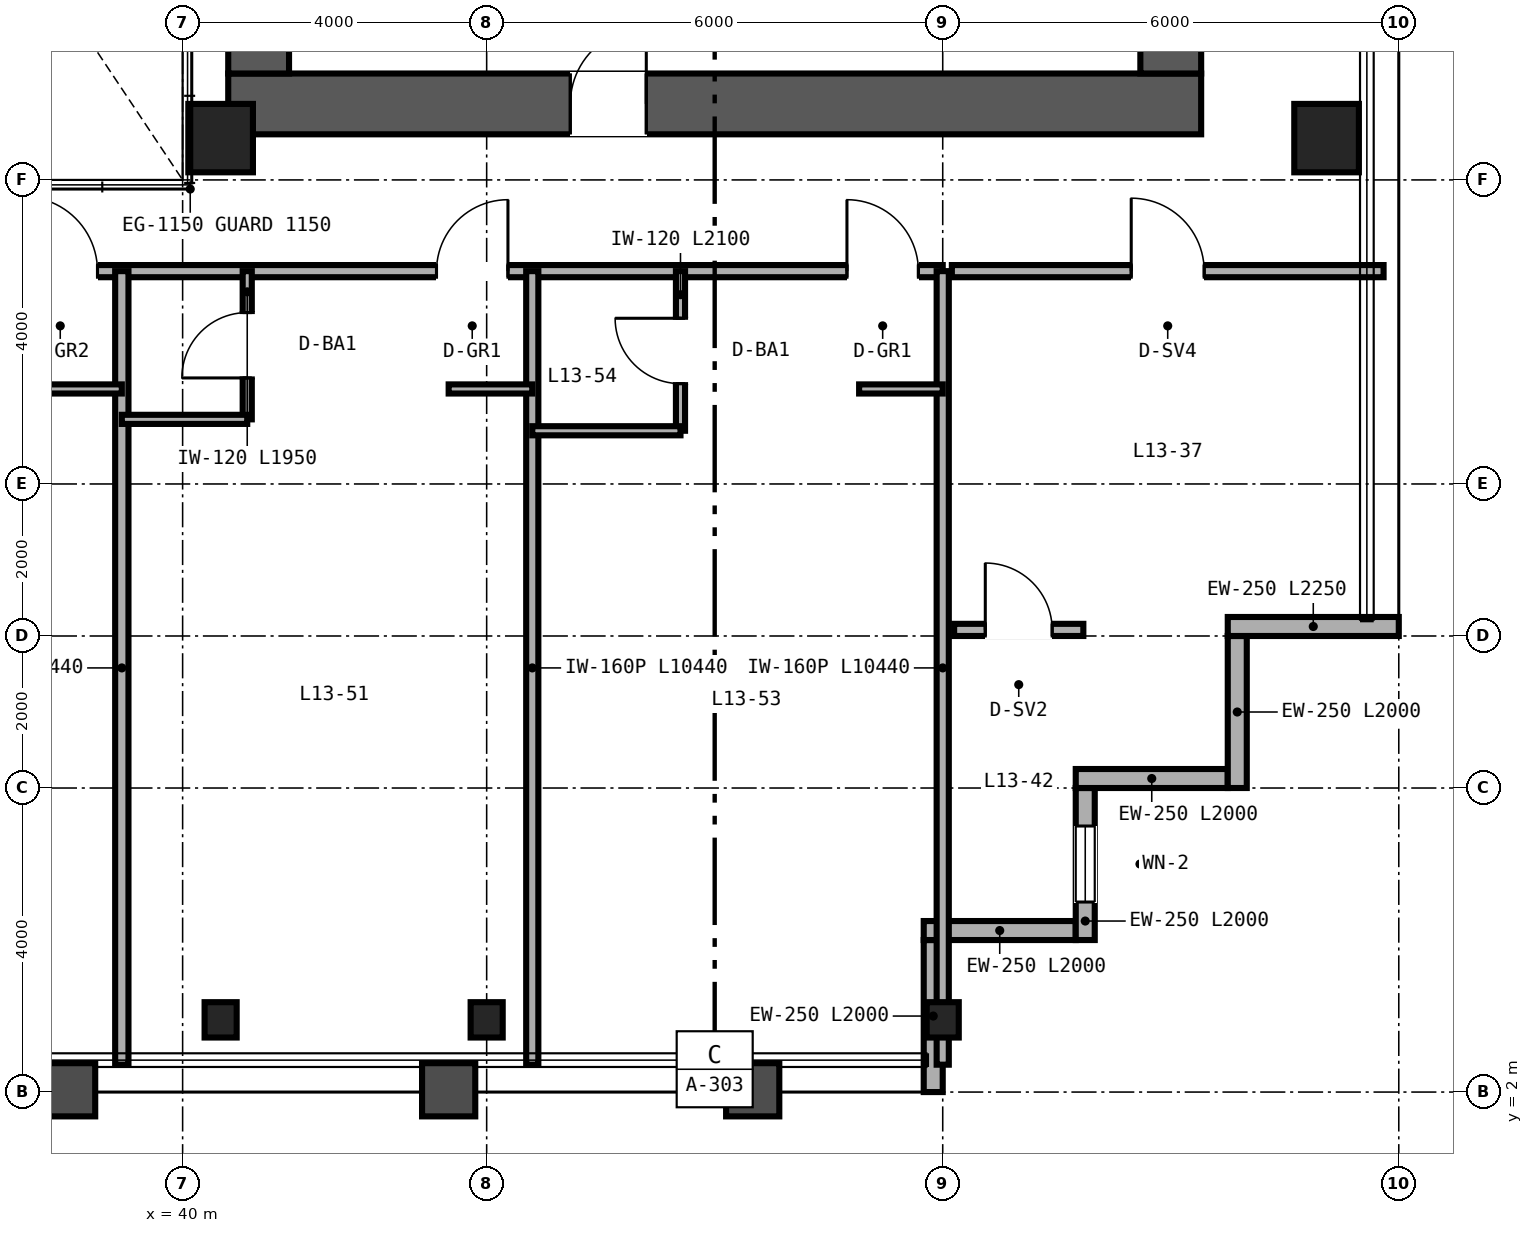
"""IFC4 building model, lengths in metres.
Left out: names, types, materials, properties, quantities, classifications, styles, units other than length and angle.
Written with IfcOpenShell. Run it as: python <this file> out.ifc"""

import sys

from ifc_helpers import new_model, si_unit, direction, frame, frame_2d, origin, origin_2d, place, context, subcontext, project, spatial, rectangle, hollow_rectangle, i_section, extrude, source, transform, mapped, element, fill, save


model = new_model("IFC4")
c1 = context("Model", 3, precision=1e-05, world=origin(), true_north=direction((0.0, 1.0)))
c2 = subcontext(c1, "Body", "Model", "MODEL_VIEW")
j1 = project(units=[si_unit("LENGTHUNIT", "METRE"), si_unit("PLANEANGLEUNIT", "RADIAN")], contexts=[c1])
p1 = place(None, origin())
s1 = spatial("IfcSite", under=j1, at=p1, CompositionType="ELEMENT")
p2 = place(p1, origin())
s2 = spatial("IfcBuilding", under=s1, at=p2, CompositionType="ELEMENT")
p3 = place(p2, frame((0.0, 0.0, 56.4)))
s3 = spatial("IfcBuildingStorey", under=s2, at=p3, CompositionType="ELEMENT", Elevation=56.4)
p4 = place(p3, frame((40.6, 15.0, 0.0), z_axis=(0.0, 0.0, 1.0), x_axis=(1.0, 0.0, 0.0)))
e1 = element("IfcWall", 1, at=p4, inside=s3, PredefinedType="SHEAR", context=c2, shape_type="SweptSolid", body=[
    extrude(rectangle(XDim=12.8, YDim=0.8, at=frame_2d((6.4, 0.0))), origin(), (0.0, 0.0, 1.0), 3.35),
])
p5 = place(p4, frame((4.5, 0.0, 0.0)))
e2 = element("IfcOpeningElement", 2, at=p5, cuts=e1, PredefinedType="OPENING", context=c2, shape_type="SweptSolid", body=[
    extrude(rectangle(XDim=1.0, YDim=2.15, at=frame_2d((0.5, 1.075))), frame((0.0, 0.41, 0.0), z_axis=(0.0, -1.0, 0.0), x_axis=(1.0, 0.0, 0.0)), (0.0, 0.0, 1.0), 0.82),
])
for number, where, z_axis, x_axis in (
    (3, (41.0, 15.4, 0.0), (0.0, 0.0, 1.0), (0.0, 1.0, 0.0)),
    (4, (53.0, 15.4, 0.0), (0.0, 0.0, 1.0), (0.0, 1.0, 0.0)),
):
    element("IfcWall", number, at=place(p3, frame(where, z_axis=z_axis, x_axis=x_axis)), inside=s3, PredefinedType="SHEAR", context=c2, shape_type="SweptSolid", body=[
        extrude(rectangle(XDim=21.2, YDim=0.8, at=frame_2d((10.6, 0.0))), origin(), (0.0, 0.0, 1.0), 3.35),
    ])
m1 = source(origin(), c2, "Body", "SweptSolid", [
    extrude(hollow_rectangle(XDim=0.85, YDim=0.9, WallThickness=0.04, at=origin_2d()), origin(), (0.0, 0.0, 1.0), 3.35),
])
for number, where, z_axis, x_axis in (
    (5, (40.5, 14.55, 0.0), (0.0, 0.0, 1.0), (1.0, 0.0, 0.0)),
    (6, (55.05, 14.55, 0.0), (0.0, 0.0, 1.0), (1.0, 0.0, 0.0)),
):
    element("IfcColumn", number, at=place(p3, frame(where, z_axis=z_axis, x_axis=x_axis)), inside=s3, PredefinedType="COLUMN", context=c2, shape_type="MappedRepresentation", body=[
        mapped(m1, transform((0.0, 0.0, 0.0), scale=1.0)),
    ])
m2 = source(origin(), c2, "Body", "SweptSolid", [
    extrude(i_section(OverallWidth=0.422, OverallDepth=0.465, WebThickness=0.045, FlangeThickness=0.073, FilletRadius=0.025, at=origin_2d()), origin(), (0.0, 0.0, 1.0), 3.35),
])
for number, where, z_axis, x_axis in (
    (7, (40.5, 2.95, 0.0), (0.0, 0.0, 1.0), (1.0, 0.0, 0.0)),
    (8, (44.0, 2.95, 0.0), (0.0, 0.0, 1.0), (1.0, 0.0, 0.0)),
    (9, (50.0, 2.95, 0.0), (0.0, 0.0, 1.0), (1.0, 0.0, 0.0)),
):
    element("IfcColumn", number, at=place(p3, frame(where, z_axis=z_axis, x_axis=x_axis)), inside=s3, PredefinedType="COLUMN", context=c2, shape_type="MappedRepresentation", body=[
        mapped(m2, transform((0.0, 0.0, 0.0), scale=1.0)),
    ])
p6 = place(p3, frame((49.875, 2.0, 0.0), z_axis=(0.0, 0.0, 1.0), x_axis=(0.0, 1.0, 0.0)))
e10 = element("IfcWall", 10, at=p6, inside=s3, PredefinedType="SOLIDWALL", context=c2, shape_type="SweptSolid", body=[
    extrude(rectangle(XDim=2.0, YDim=0.25, at=frame_2d((1.0, 0.0))), origin(), (0.0, 0.0, 1.0), 2.657),
])
p7 = place(p3, frame((49.75, 4.125, 0.0), z_axis=(0.0, 0.0, 1.0), x_axis=(1.0, 0.0, 0.0)))
e11 = element("IfcWall", 11, at=p7, inside=s3, PredefinedType="SOLIDWALL", context=c2, shape_type="SweptSolid", body=[
    extrude(rectangle(XDim=2.0, YDim=0.25, at=frame_2d((1.0, 0.0))), origin(), (0.0, 0.0, 1.0), 3.35),
])
p8 = place(p3, frame((51.875, 4.0, 0.0), z_axis=(0.0, 0.0, 1.0), x_axis=(0.0, 1.0, 0.0)))
e12 = element("IfcWall", 12, at=p8, inside=s3, PredefinedType="SOLIDWALL", context=c2, shape_type="SweptSolid", body=[
    extrude(rectangle(XDim=2.0, YDim=0.25, at=frame_2d((1.0, 0.0))), origin(), (0.0, 0.0, 1.0), 3.35),
])
p9 = place(p8, frame((0.5, 0.0, 0.85)))
e13 = element("IfcOpeningElement", 13, at=p9, cuts=e12, PredefinedType="OPENING", context=c2, shape_type="SweptSolid", body=[
    extrude(rectangle(XDim=1.0, YDim=1.9, at=frame_2d((0.5, 0.95))), frame((0.0, 0.135, 0.0), z_axis=(0.0, -1.0, 0.0), x_axis=(1.0, 0.0, 0.0)), (0.0, 0.0, 1.0), 0.27),
])
for number, where, z_axis, x_axis in (
    (14, (51.75, 6.125, 0.0), (0.0, 0.0, 1.0), (1.0, 0.0, 0.0)),
    (15, (53.875, 6.0, 0.0), (0.0, 0.0, 1.0), (0.0, 1.0, 0.0)),
):
    element("IfcWall", number, at=place(p3, frame(where, z_axis=z_axis, x_axis=x_axis)), inside=s3, PredefinedType="SOLIDWALL", context=c2, shape_type="SweptSolid", body=[
        extrude(rectangle(XDim=2.0, YDim=0.25, at=frame_2d((1.0, 0.0))), origin(), (0.0, 0.0, 1.0), 3.35),
    ])
p10 = place(p3, frame((53.75, 8.125, 0.0), z_axis=(0.0, 0.0, 1.0), x_axis=(1.0, 0.0, 0.0)))
e16 = element("IfcWall", 16, at=p10, inside=s3, PredefinedType="SOLIDWALL", context=c2, shape_type="SweptSolid", body=[
    extrude(rectangle(XDim=2.25, YDim=0.25, at=frame_2d((1.125, 0.0))), origin(), (0.0, 0.0, 1.0), 3.35),
])
p11 = place(p3, frame((50.12, 12.8, 0.0), z_axis=(0.0, 0.0, 1.0), x_axis=(1.0, 0.0, 0.0)))
e17 = element("IfcWall", 17, at=p11, inside=s3, PredefinedType="PARTITIONING", context=c2, shape_type="SweptSolid", body=[
    extrude(rectangle(XDim=5.68, YDim=0.16, at=frame_2d((2.84, 0.0))), origin(), (0.0, 0.0, 1.0), 3.35),
])
p12 = place(p11, frame((2.36, 0.0, 0.0)))
e18 = element("IfcOpeningElement", 18, at=p12, cuts=e17, PredefinedType="OPENING", context=c2, shape_type="SweptSolid", body=[
    extrude(rectangle(XDim=0.96, YDim=2.15, at=frame_2d((0.48, 1.075))), frame((0.0, 0.09, 0.0), z_axis=(0.0, -1.0, 0.0), x_axis=(1.0, 0.0, 0.0)), (0.0, 0.0, 1.0), 0.18),
])
p13 = place(p3, frame((50.15, 8.08, 0.0), z_axis=(0.0, 0.0, 1.0), x_axis=(1.0, 0.0, 0.0)))
e19 = element("IfcWall", 19, at=p13, inside=s3, PredefinedType="PARTITIONING", context=c2, shape_type="SweptSolid", body=[
    extrude(rectangle(XDim=1.7, YDim=0.16, at=frame_2d((0.85, 0.0))), origin(), (0.0, 0.0, 1.0), 3.35),
])
p14 = place(p13, frame((0.41, 0.0, 0.0)))
e20 = element("IfcOpeningElement", 20, at=p14, cuts=e19, PredefinedType="OPENING", context=c2, shape_type="SweptSolid", body=[
    extrude(rectangle(XDim=0.88, YDim=2.15, at=frame_2d((0.44, 1.075))), frame((0.0, 0.09, 0.0), z_axis=(0.0, -1.0, 0.0), x_axis=(1.0, 0.0, 0.0)), (0.0, 0.0, 1.0), 0.18),
])
p15 = place(p3, frame((14.0, 12.8, 0.0), z_axis=(0.0, 0.0, 1.0), x_axis=(1.0, 0.0, 0.0)))
e21 = element("IfcWall", 21, at=p15, inside=s3, PredefinedType="PARTITIONING", context=c2, shape_type="SweptSolid", body=[
    extrude(rectangle(XDim=36.0, YDim=0.16, at=frame_2d((18.0, 0.0))), origin(), (0.0, 0.0, 1.0), 2.571),
])
p16 = place(p15, frame((7.1, 0.0, 0.0)))
e22 = element("IfcOpeningElement", 22, at=p16, cuts=e21, PredefinedType="OPENING", context=c2, shape_type="SweptSolid", body=[
    extrude(rectangle(XDim=0.98, YDim=2.2, at=frame_2d((0.49, 1.1))), frame((0.0, 0.09, 0.0), z_axis=(0.0, -1.0, 0.0), x_axis=(1.0, 0.0, 0.0)), (0.0, 0.0, 1.0), 0.18),
])
p17 = place(p15, frame((15.5, 0.0, 0.0)))
e23 = element("IfcOpeningElement", 23, at=p17, cuts=e21, PredefinedType="OPENING", context=c2, shape_type="SweptSolid", body=[
    extrude(rectangle(XDim=0.98, YDim=2.2, at=frame_2d((0.49, 1.1))), frame((0.0, 0.09, 0.0), z_axis=(0.0, -1.0, 0.0), x_axis=(1.0, 0.0, 0.0)), (0.0, 0.0, 1.0), 0.18),
])
p18 = place(p15, frame((23.9, 0.0, 0.0)))
e24 = element("IfcOpeningElement", 24, at=p18, cuts=e21, PredefinedType="OPENING", context=c2, shape_type="SweptSolid", body=[
    extrude(rectangle(XDim=0.98, YDim=2.2, at=frame_2d((0.49, 1.1))), frame((0.0, 0.09, 0.0), z_axis=(0.0, -1.0, 0.0), x_axis=(1.0, 0.0, 0.0)), (0.0, 0.0, 1.0), 0.18),
])
p19 = place(p15, frame((29.34, 0.0, 0.0)))
e25 = element("IfcOpeningElement", 25, at=p19, cuts=e21, PredefinedType="OPENING", context=c2, shape_type="SweptSolid", body=[
    extrude(rectangle(XDim=0.94, YDim=2.15, at=frame_2d((0.47, 1.075))), frame((0.0, 0.09, 0.0), z_axis=(0.0, -1.0, 0.0), x_axis=(1.0, 0.0, 0.0)), (0.0, 0.0, 1.0), 0.18),
])
p20 = place(p15, frame((34.74, 0.0, 0.0)))
e26 = element("IfcOpeningElement", 26, at=p20, cuts=e21, PredefinedType="OPENING", context=c2, shape_type="SweptSolid", body=[
    extrude(rectangle(XDim=0.94, YDim=2.15, at=frame_2d((0.47, 1.075))), frame((0.0, 0.09, 0.0), z_axis=(0.0, -1.0, 0.0), x_axis=(1.0, 0.0, 0.0)), (0.0, 0.0, 1.0), 0.18),
])
p21 = place(p3, frame((50.0, 2.36, 0.0), z_axis=(0.0, 0.0, 1.0), x_axis=(0.0, 1.0, 0.0)))
e27 = element("IfcWall", 27, at=p21, inside=s3, PredefinedType="PARTITIONING", context=c2, shape_type="SweptSolid", body=[
    extrude(rectangle(XDim=10.44, YDim=0.16, at=frame_2d((5.22, 0.0))), origin(), (0.0, 0.0, 1.0), 2.657),
])
p22 = place(p3, frame((39.2, 2.36, 0.0), z_axis=(0.0, 0.0, 1.0), x_axis=(0.0, 1.0, 0.0)))
e28 = element("IfcWall", 28, at=p22, inside=s3, PredefinedType="PARTITIONING", context=c2, shape_type="SweptSolid", body=[
    extrude(rectangle(XDim=10.44, YDim=0.175, at=frame_2d((5.22, 0.0))), origin(), (0.0, 0.0, 1.0), 2.423),
])
p23 = place(p3, frame((38.1, 11.25, 0.0), z_axis=(0.0, 0.0, 1.0), x_axis=(1.0, 0.0, 0.0)))
e29 = element("IfcWall", 29, at=p23, inside=s3, PredefinedType="PARTITIONING", context=c2, shape_type="SweptSolid", body=[
    extrude(rectangle(XDim=1.1, YDim=0.12, at=frame_2d((0.55, 0.0))), origin(), (0.0, 0.0, 1.0), 3.35),
])
p24 = place(p3, frame((44.6, 2.36, 0.0), z_axis=(0.0, 0.0, 1.0), x_axis=(0.0, 1.0, 0.0)))
e30 = element("IfcWall", 30, at=p24, inside=s3, PredefinedType="PARTITIONING", context=c2, shape_type="SweptSolid", body=[
    extrude(rectangle(XDim=10.44, YDim=0.16, at=frame_2d((5.22, 0.0))), origin(), (0.0, 0.0, 1.0), 2.657),
])
p25 = place(p3, frame((40.85, 10.85, 0.0), z_axis=(0.0, 0.0, 1.0), x_axis=(0.0, 1.0, 0.0)))
e31 = element("IfcWall", 31, at=p25, inside=s3, PredefinedType="PARTITIONING", context=c2, shape_type="SweptSolid", body=[
    extrude(rectangle(XDim=1.95, YDim=0.12, at=frame_2d((0.975, 0.0))), origin(), (0.0, 0.0, 1.0), 3.35),
])
p26 = place(p25, frame((0.545, 0.0, 0.0)))
e32 = element("IfcOpeningElement", 32, at=p26, cuts=e31, PredefinedType="OPENING", context=c2, shape_type="SweptSolid", body=[
    extrude(rectangle(XDim=0.86, YDim=2.1, at=frame_2d((0.43, 1.05))), frame((0.0, 0.07, 0.0), z_axis=(0.0, -1.0, 0.0), x_axis=(1.0, 0.0, 0.0)), (0.0, 0.0, 1.0), 0.14),
])
p27 = place(p3, frame((39.2, 10.85, 0.0), z_axis=(0.0, 0.0, 1.0), x_axis=(1.0, 0.0, 0.0)))
e33 = element("IfcWall", 33, at=p27, inside=s3, PredefinedType="PARTITIONING", context=c2, shape_type="SweptSolid", body=[
    extrude(rectangle(XDim=1.65, YDim=0.12, at=frame_2d((0.825, 0.0))), origin(), (0.0, 0.0, 1.0), 2.571),
])
p28 = place(p3, frame((43.5, 11.25, 0.0), z_axis=(0.0, 0.0, 1.0), x_axis=(1.0, 0.0, 0.0)))
e34 = element("IfcWall", 34, at=p28, inside=s3, PredefinedType="PARTITIONING", context=c2, shape_type="SweptSolid", body=[
    extrude(rectangle(XDim=1.1, YDim=0.12, at=frame_2d((0.55, 0.0))), origin(), (0.0, 0.0, 1.0), 3.35),
])
p29 = place(p3, frame((46.55, 10.7, 0.0), z_axis=(0.0, 0.0, 1.0), x_axis=(0.0, 1.0, 0.0)))
e35 = element("IfcWall", 35, at=p29, inside=s3, PredefinedType="PARTITIONING", context=c2, shape_type="SweptSolid", body=[
    extrude(rectangle(XDim=2.1, YDim=0.12, at=frame_2d((1.05, 0.0))), origin(), (0.0, 0.0, 1.0), 3.35),
])
p30 = place(p29, frame((0.62, 0.0, 0.0)))
e36 = element("IfcOpeningElement", 36, at=p30, cuts=e35, PredefinedType="OPENING", context=c2, shape_type="SweptSolid", body=[
    extrude(rectangle(XDim=0.86, YDim=2.1, at=frame_2d((0.43, 1.05))), frame((0.0, 0.07, 0.0), z_axis=(0.0, -1.0, 0.0), x_axis=(1.0, 0.0, 0.0)), (0.0, 0.0, 1.0), 0.14),
])
p31 = place(p3, frame((44.6, 10.7, 0.0), z_axis=(0.0, 0.0, 1.0), x_axis=(1.0, 0.0, 0.0)))
e37 = element("IfcWall", 37, at=p31, inside=s3, PredefinedType="PARTITIONING", context=c2, shape_type="SweptSolid", body=[
    extrude(rectangle(XDim=1.95, YDim=0.12, at=frame_2d((0.975, 0.0))), origin(), (0.0, 0.0, 1.0), 3.35),
])
p32 = place(p3, frame((48.9, 11.25, 0.0), z_axis=(0.0, 0.0, 1.0), x_axis=(1.0, 0.0, 0.0)))
e38 = element("IfcWall", 38, at=p32, inside=s3, PredefinedType="PARTITIONING", context=c2, shape_type="SweptSolid", body=[
    extrude(rectangle(XDim=1.1, YDim=0.12, at=frame_2d((0.55, 0.0))), origin(), (0.0, 0.0, 1.0), 3.35),
])
m3 = source(origin(), c2, "Body", "SweptSolid", [
    extrude(rectangle(XDim=1.0, YDim=1.9, at=frame_2d((0.5, 0.95))), frame((0.0, 0.03, 0.0), z_axis=(0.0, -1.0, 0.0), x_axis=(1.0, 0.0, 0.0)), (0.0, 0.0, 1.0), 0.06),
])
p33 = place(p9, origin())
e39 = element("IfcWindow", 39, at=p33, inside=s3, PartitioningType="SINGLE_PANEL", PredefinedType="WINDOW", context=c2, shape_type="MappedRepresentation", body=[
    mapped(m3, transform((0.0, 0.0, 0.0), scale=1.0)),
])
fill(e13, e39)
m4 = source(origin(), c2, "Body", "SweptSolid", [
    extrude(rectangle(XDim=1.0, YDim=2.15, at=frame_2d((0.5, 1.075))), frame((0.0, 0.025, 0.0), z_axis=(0.0, -1.0, 0.0), x_axis=(1.0, 0.0, 0.0)), (0.0, 0.0, 1.0), 0.05),
])
p34 = place(p5, origin())
e40 = element("IfcDoor", 40, at=p34, inside=s3, OperationType="SINGLE_SWING_RIGHT", PredefinedType="DOOR", context=c2, shape_type="MappedRepresentation", body=[
    mapped(m4, transform((0.0, 0.0, 0.0), scale=1.0)),
])
fill(e2, e40)
m5 = source(origin(), c2, "Body", "SweptSolid", [
    extrude(rectangle(XDim=0.96, YDim=2.15, at=frame_2d((0.48, 1.075))), frame((0.0, 0.025, 0.0), z_axis=(0.0, -1.0, 0.0), x_axis=(1.0, 0.0, 0.0)), (0.0, 0.0, 1.0), 0.05),
])
p35 = place(p12, origin())
e41 = element("IfcDoor", 41, at=p35, inside=s3, OperationType="SINGLE_SWING_LEFT", PredefinedType="DOOR", context=c2, shape_type="MappedRepresentation", body=[
    mapped(m5, transform((0.0, 0.0, 0.0), scale=1.0)),
])
fill(e18, e41)
m6 = source(origin(), c2, "Body", "SweptSolid", [
    extrude(rectangle(XDim=0.88, YDim=2.15, at=frame_2d((0.44, 1.075))), frame((0.0, 0.025, 0.0), z_axis=(0.0, -1.0, 0.0), x_axis=(1.0, 0.0, 0.0)), (0.0, 0.0, 1.0), 0.05),
])
p36 = place(p14, origin())
e42 = element("IfcDoor", 42, at=p36, inside=s3, OperationType="SINGLE_SWING_LEFT", PredefinedType="DOOR", context=c2, shape_type="MappedRepresentation", body=[
    mapped(m6, transform((0.0, 0.0, 0.0), scale=1.0)),
])
fill(e20, e42)
m7 = source(origin(), c2, "Body", "SweptSolid", [
    extrude(rectangle(XDim=0.86, YDim=2.1, at=frame_2d((0.43, 1.05))), frame((0.0, 0.025, 0.0), z_axis=(0.0, -1.0, 0.0), x_axis=(1.0, 0.0, 0.0)), (0.0, 0.0, 1.0), 0.05),
])
p37 = place(p26, origin())
e43 = element("IfcDoor", 43, at=p37, inside=s3, OperationType="SINGLE_SWING_LEFT", PredefinedType="DOOR", context=c2, shape_type="MappedRepresentation", body=[
    mapped(m7, transform((0.0, 0.0, 0.0), scale=1.0)),
])
fill(e32, e43)
p38 = place(p30, origin())
e44 = element("IfcDoor", 44, at=p38, inside=s3, OperationType="SINGLE_SWING_RIGHT", PredefinedType="DOOR", context=c2, shape_type="MappedRepresentation", body=[
    mapped(m7, transform((0.0, 0.0, 0.0), scale=1.0)),
])
fill(e36, e44)
m8 = source(origin(), c2, "Body", "SweptSolid", [
    extrude(rectangle(XDim=0.98, YDim=2.2, at=frame_2d((0.49, 1.1))), frame((0.0, 0.025, 0.0), z_axis=(0.0, -1.0, 0.0), x_axis=(1.0, 0.0, 0.0)), (0.0, 0.0, 1.0), 0.05),
])
p39 = place(p18, origin())
e45 = element("IfcDoor", 45, at=p39, inside=s3, OperationType="SINGLE_SWING_LEFT", PredefinedType="DOOR", context=c2, shape_type="MappedRepresentation", body=[
    mapped(m8, transform((0.0, 0.0, 0.0), scale=1.0)),
])
fill(e24, e45)
m9 = source(origin(), c2, "Body", "SweptSolid", [
    extrude(rectangle(XDim=0.94, YDim=2.15, at=frame_2d((0.47, 1.075))), frame((0.0, 0.025, 0.0), z_axis=(0.0, -1.0, 0.0), x_axis=(1.0, 0.0, 0.0)), (0.0, 0.0, 1.0), 0.05),
])
p40 = place(p19, origin())
e46 = element("IfcDoor", 46, at=p40, inside=s3, OperationType="SINGLE_SWING_RIGHT", PredefinedType="DOOR", context=c2, shape_type="MappedRepresentation", body=[
    mapped(m9, transform((0.0, 0.0, 0.0), scale=1.0)),
])
fill(e25, e46)
p41 = place(p20, origin())
e47 = element("IfcDoor", 47, at=p41, inside=s3, OperationType="SINGLE_SWING_LEFT", PredefinedType="DOOR", context=c2, shape_type="MappedRepresentation", body=[
    mapped(m9, transform((0.0, 0.0, 0.0), scale=1.0)),
])
fill(e26, e47)
save(model, sys.argv[1])
